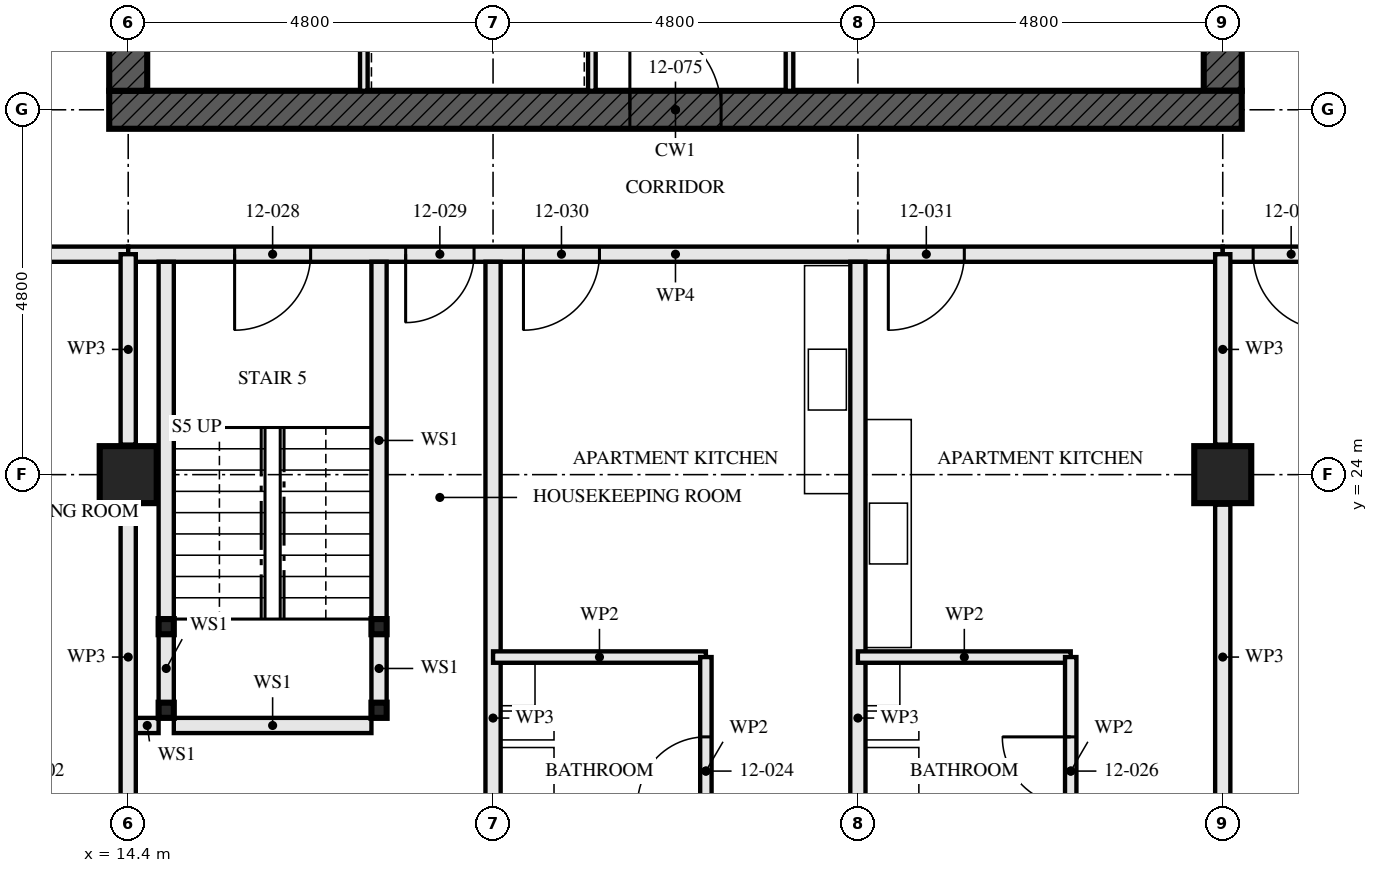
"""IFC4 building model, lengths in metres.
Left out: names, types, materials, properties, quantities, classifications, styles, units other than length and angle.
Written with IfcOpenShell. Run it as: python <this file> out.ifc"""

import sys

from ifc_helpers import new_model, si_unit, direction, frame, frame_2d, origin, origin_2d, place, context, subcontext, project, spatial, rectangle, hollow_rectangle, extrude, element, fill, save


model = new_model("IFC4")
c1 = context("Model", 3, precision=1e-05, world=origin(), true_north=direction((0.0, 1.0)))
c2 = subcontext(c1, "Body", "Model", "MODEL_VIEW")
j1 = project(units=[si_unit("LENGTHUNIT", "METRE"), si_unit("PLANEANGLEUNIT", "RADIAN")], contexts=[c1])
p1 = place(None, origin())
s1 = spatial("IfcSite", under=j1, at=p1, CompositionType="ELEMENT")
p2 = place(p1, origin())
s2 = spatial("IfcBuilding", under=s1, at=p2, CompositionType="ELEMENT")
p3 = place(p2, frame((0.0, 0.0, 48.0)))
s3 = spatial("IfcBuildingStorey", under=s2, at=p3, CompositionType="ELEMENT", Elevation=48.0)
for number, where, z_axis, x_axis in (
    (1, (14.4, 24.0, 0.0), (0.0, 0.0, 1.0), (1.0, 0.0, 0.0)),
    (2, (28.8, 24.0, 0.0), (0.0, 0.0, 1.0), (1.0, 0.0, 0.0)),
):
    element("IfcColumn", number, at=place(p3, frame(where, z_axis=z_axis, x_axis=x_axis)), inside=s3, PredefinedType="COLUMN", context=c2, shape_type="SweptSolid", body=[
        extrude(hollow_rectangle(XDim=0.75, YDim=0.75, WallThickness=0.08, at=origin_2d()), origin(), (0.0, 0.0, 1.0), 3.5),
    ])
p4 = place(p3, frame((14.15, 28.8, -0.17), z_axis=(0.0, 0.0, 1.0), x_axis=(1.0, 0.0, 0.0)))
e3 = element("IfcWall", 3, at=p4, inside=s3, PredefinedType="SHEAR", context=c2, shape_type="SweptSolid", body=[
    extrude(rectangle(XDim=14.9, YDim=0.5, at=frame_2d((7.45, 0.0))), origin(), (0.0, 0.0, 1.0), 3.5),
])
p5 = place(p4, frame((6.85, 0.0, 0.17)))
e4 = element("IfcOpeningElement", 4, at=p5, cuts=e3, PredefinedType="OPENING", context=c2, shape_type="SweptSolid", body=[
    extrude(rectangle(XDim=1.2, YDim=2.1, at=frame_2d((0.6, 1.05))), frame((0.0, 0.26, 0.0), z_axis=(0.0, -1.0, 0.0), x_axis=(1.0, 0.0, 0.0)), (0.0, 0.0, 1.0), 0.521),
])
p6 = place(p3, frame((14.4, 42.95, -0.17), z_axis=(0.0, 0.0, 1.0), x_axis=(0.0, -1.0, 0.0)))
e5 = element("IfcWall", 5, at=p6, inside=s3, PredefinedType="SHEAR", context=c2, shape_type="SweptSolid", body=[
    extrude(rectangle(XDim=13.9, YDim=0.5, at=frame_2d((6.95, 0.0))), origin(), (0.0, 0.0, 1.0), 3.5),
])
p7 = place(p6, frame((6.35, 0.0, 0.17)))
e6 = element("IfcOpeningElement", 6, at=p7, cuts=e5, PredefinedType="OPENING", context=c2, shape_type="SweptSolid", body=[
    extrude(rectangle(XDim=1.2, YDim=2.1, at=frame_2d((0.6, 1.05))), frame((0.0, 0.26, 0.0), z_axis=(0.0, -1.0, 0.0), x_axis=(1.0, 0.0, 0.0)), (0.0, 0.0, 1.0), 0.521),
])
p8 = place(p3, frame((28.8, 29.05, -0.17), z_axis=(0.0, 0.0, 1.0), x_axis=(0.0, 1.0, 0.0)))
e7 = element("IfcWall", 7, at=p8, inside=s3, PredefinedType="SHEAR", context=c2, shape_type="SweptSolid", body=[
    extrude(rectangle(XDim=13.9, YDim=0.5, at=frame_2d((6.95, 0.0))), origin(), (0.0, 0.0, 1.0), 3.5),
])
p9 = place(p8, frame((6.35, 0.0, 0.17)))
e8 = element("IfcOpeningElement", 8, at=p9, cuts=e7, PredefinedType="OPENING", context=c2, shape_type="SweptSolid", body=[
    extrude(rectangle(XDim=1.2, YDim=2.1, at=frame_2d((0.6, 1.05))), frame((0.0, 0.26, 0.0), z_axis=(0.0, -1.0, 0.0), x_axis=(1.0, 0.0, 0.0)), (0.0, 0.0, 1.0), 0.521),
])
for number, where, z_axis, x_axis in (
    (9, (14.9, 20.9, 0.0), (0.0, 0.0, 1.0), (1.0, 0.0, 0.0)),
    (10, (17.7, 20.9, 0.0), (0.0, 0.0, 1.0), (1.0, 0.0, 0.0)),
    (11, (14.9, 22.0, 0.0), (0.0, 0.0, 1.0), (1.0, 0.0, 0.0)),
    (12, (17.7, 22.0, 0.0), (0.0, 0.0, 1.0), (1.0, 0.0, 0.0)),
):
    element("IfcColumn", number, at=place(p3, frame(where, z_axis=z_axis, x_axis=x_axis)), inside=s3, PredefinedType="COLUMN", context=c2, shape_type="SweptSolid", body=[
        extrude(hollow_rectangle(XDim=0.2, YDim=0.2, WallThickness=0.008, at=origin_2d()), origin(), (0.0, 0.0, 1.0), 3.33),
    ])
p10 = place(p3, frame((4.8, 26.9, 0.0), z_axis=(0.0, 0.0, 1.0), x_axis=(1.0, 0.0, 0.0)))
e13 = element("IfcWall", 13, at=p10, inside=s3, PredefinedType="PARTITIONING", context=c2, shape_type="SweptSolid", body=[
    extrude(rectangle(XDim=9.6, YDim=0.2, at=frame_2d((4.8, 0.0))), origin(), (0.0, 0.0, 1.0), 3.33),
])
p11 = place(p10, frame((0.4, 0.0, 0.0)))
e14 = element("IfcOpeningElement", 14, at=p11, cuts=e13, PredefinedType="OPENING", context=c2, shape_type="SweptSolid", body=[
    extrude(rectangle(XDim=1.0, YDim=2.1, at=frame_2d((0.5, 1.05))), frame((0.0, 0.111, 0.0), z_axis=(0.0, -1.0, 0.0), x_axis=(1.0, 0.0, 0.0)), (0.0, 0.0, 1.0), 0.221),
])
p12 = place(p3, frame((14.9, 21.0, 0.0), z_axis=(0.0, 0.0, 1.0), x_axis=(0.0, 1.0, 0.0)))
e15 = element("IfcWall", 15, at=p12, inside=s3, PredefinedType="SOLIDWALL", context=c2, shape_type="SweptSolid", body=[
    extrude(rectangle(XDim=0.9, YDim=0.2, at=frame_2d((0.45, 0.0))), origin(), (0.0, 0.0, 1.0), 2.99),
])
p13 = place(p3, frame((14.9, 22.1, 0.0), z_axis=(0.0, 0.0, 1.0), x_axis=(0.0, 1.0, 0.0)))
e16 = element("IfcWall", 16, at=p13, inside=s3, PredefinedType="SOLIDWALL", context=c2, shape_type="SweptSolid", body=[
    extrude(rectangle(XDim=4.7, YDim=0.2, at=frame_2d((2.35, 0.0))), origin(), (0.0, 0.0, 1.0), 2.99),
])
p14 = place(p3, frame((17.7, 21.0, 0.0), z_axis=(0.0, 0.0, 1.0), x_axis=(0.0, 1.0, 0.0)))
e17 = element("IfcWall", 17, at=p14, inside=s3, PredefinedType="SOLIDWALL", context=c2, shape_type="SweptSolid", body=[
    extrude(rectangle(XDim=0.9, YDim=0.2, at=frame_2d((0.45, 0.0))), origin(), (0.0, 0.0, 1.0), 2.99),
])
p15 = place(p3, frame((17.7, 22.1, 0.0), z_axis=(0.0, 0.0, 1.0), x_axis=(0.0, 1.0, 0.0)))
e18 = element("IfcWall", 18, at=p15, inside=s3, PredefinedType="SOLIDWALL", context=c2, shape_type="SweptSolid", body=[
    extrude(rectangle(XDim=4.7, YDim=0.2, at=frame_2d((2.35, 0.0))), origin(), (0.0, 0.0, 1.0), 2.99),
])
p16 = place(p3, frame((14.5, 20.7, 0.0), z_axis=(0.0, 0.0, 1.0), x_axis=(1.0, 0.0, 0.0)))
e19 = element("IfcWall", 19, at=p16, inside=s3, PredefinedType="SOLIDWALL", context=c2, shape_type="SweptSolid", body=[
    extrude(rectangle(XDim=0.3, YDim=0.2, at=frame_2d((0.15, 0.0))), origin(), (0.0, 0.0, 1.0), 3.33),
])
p17 = place(p3, frame((15.0, 20.7, 0.0), z_axis=(0.0, 0.0, 1.0), x_axis=(1.0, 0.0, 0.0)))
e20 = element("IfcWall", 20, at=p17, inside=s3, PredefinedType="SOLIDWALL", context=c2, shape_type="SweptSolid", body=[
    extrude(rectangle(XDim=2.6, YDim=0.2, at=frame_2d((1.3, 0.0))), origin(), (0.0, 0.0, 1.0), 3.33),
])
p18 = place(p3, frame((19.2, 14.795, 0.0), z_axis=(0.0, 0.0, 1.0), x_axis=(0.0, 1.0, 0.0)))
e21 = element("IfcWall", 21, at=p18, inside=s3, PredefinedType="PARTITIONING", context=c2, shape_type="SweptSolid", body=[
    extrude(rectangle(XDim=12.005, YDim=0.2, at=frame_2d((6.002, 0.0))), origin(), (0.0, 0.0, 1.0), 2.55),
])
p19 = place(p3, frame((22.0, 18.6, 0.0), z_axis=(0.0, 0.0, 1.0), x_axis=(0.0, 1.0, 0.0)))
e22 = element("IfcWall", 22, at=p19, inside=s3, PredefinedType="PARTITIONING", context=c2, shape_type="SweptSolid", body=[
    extrude(rectangle(XDim=3.0, YDim=0.15, at=frame_2d((1.5, 0.0))), origin(), (0.0, 0.0, 1.0), 2.55),
])
p20 = place(p19, frame((1.05, 0.0, 0.0)))
e23 = element("IfcOpeningElement", 23, at=p20, cuts=e22, PredefinedType="OPENING", context=c2, shape_type="SweptSolid", body=[
    extrude(rectangle(XDim=0.9, YDim=2.1, at=frame_2d((0.45, 1.05))), frame((0.0, 0.085, 0.0), z_axis=(0.0, -1.0, 0.0), x_axis=(1.0, 0.0, 0.0)), (0.0, 0.0, 1.0), 0.171),
])
p21 = place(p3, frame((19.2, 21.6, 0.0), z_axis=(0.0, 0.0, 1.0), x_axis=(1.0, 0.0, 0.0)))
e24 = element("IfcWall", 24, at=p21, inside=s3, PredefinedType="PARTITIONING", context=c2, shape_type="SweptSolid", body=[
    extrude(rectangle(XDim=2.8, YDim=0.15, at=frame_2d((1.4, 0.0))), origin(), (0.0, 0.0, 1.0), 3.33),
])
p22 = place(p3, frame((24.0, 14.795, 0.0), z_axis=(0.0, 0.0, 1.0), x_axis=(0.0, 1.0, 0.0)))
e25 = element("IfcWall", 25, at=p22, inside=s3, PredefinedType="PARTITIONING", context=c2, shape_type="SweptSolid", body=[
    extrude(rectangle(XDim=12.005, YDim=0.2, at=frame_2d((6.002, 0.0))), origin(), (0.0, 0.0, 1.0), 2.55),
])
p23 = place(p3, frame((26.8, 18.6, 0.0), z_axis=(0.0, 0.0, 1.0), x_axis=(0.0, 1.0, 0.0)))
e26 = element("IfcWall", 26, at=p23, inside=s3, PredefinedType="PARTITIONING", context=c2, shape_type="SweptSolid", body=[
    extrude(rectangle(XDim=3.0, YDim=0.15, at=frame_2d((1.5, 0.0))), origin(), (0.0, 0.0, 1.0), 2.55),
])
p24 = place(p23, frame((1.05, 0.0, 0.0)))
e27 = element("IfcOpeningElement", 27, at=p24, cuts=e26, PredefinedType="OPENING", context=c2, shape_type="SweptSolid", body=[
    extrude(rectangle(XDim=0.9, YDim=2.1, at=frame_2d((0.45, 1.05))), frame((0.0, 0.085, 0.0), z_axis=(0.0, -1.0, 0.0), x_axis=(1.0, 0.0, 0.0)), (0.0, 0.0, 1.0), 0.171),
])
p25 = place(p3, frame((24.0, 21.6, 0.0), z_axis=(0.0, 0.0, 1.0), x_axis=(1.0, 0.0, 0.0)))
e28 = element("IfcWall", 28, at=p25, inside=s3, PredefinedType="PARTITIONING", context=c2, shape_type="SweptSolid", body=[
    extrude(rectangle(XDim=2.8, YDim=0.15, at=frame_2d((1.4, 0.0))), origin(), (0.0, 0.0, 1.0), 3.33),
])
p26 = place(p3, frame((14.4, 26.9, 0.0), z_axis=(0.0, 0.0, 1.0), x_axis=(1.0, 0.0, 0.0)))
e29 = element("IfcWall", 29, at=p26, inside=s3, PredefinedType="PARTITIONING", context=c2, shape_type="SweptSolid", body=[
    extrude(rectangle(XDim=14.4, YDim=0.2, at=frame_2d((7.2, 0.0))), origin(), (0.0, 0.0, 1.0), 2.55),
])
p27 = place(p26, frame((1.4, 0.0, 0.0)))
e30 = element("IfcOpeningElement", 30, at=p27, cuts=e29, PredefinedType="OPENING", context=c2, shape_type="SweptSolid", body=[
    extrude(rectangle(XDim=1.0, YDim=2.1, at=frame_2d((0.5, 1.05))), frame((0.0, 0.111, 0.0), z_axis=(0.0, -1.0, 0.0), x_axis=(1.0, 0.0, 0.0)), (0.0, 0.0, 1.0), 0.221),
])
p28 = place(p26, frame((3.65, 0.0, 0.0)))
e31 = element("IfcOpeningElement", 31, at=p28, cuts=e29, PredefinedType="OPENING", context=c2, shape_type="SweptSolid", body=[
    extrude(rectangle(XDim=0.9, YDim=2.1, at=frame_2d((0.45, 1.05))), frame((0.0, 0.111, 0.0), z_axis=(0.0, -1.0, 0.0), x_axis=(1.0, 0.0, 0.0)), (0.0, 0.0, 1.0), 0.221),
])
p29 = place(p26, frame((5.2, 0.0, 0.0)))
e32 = element("IfcOpeningElement", 32, at=p29, cuts=e29, PredefinedType="OPENING", context=c2, shape_type="SweptSolid", body=[
    extrude(rectangle(XDim=1.0, YDim=2.1, at=frame_2d((0.5, 1.05))), frame((0.0, 0.111, 0.0), z_axis=(0.0, -1.0, 0.0), x_axis=(1.0, 0.0, 0.0)), (0.0, 0.0, 1.0), 0.221),
])
p30 = place(p26, frame((10.0, 0.0, 0.0)))
e33 = element("IfcOpeningElement", 33, at=p30, cuts=e29, PredefinedType="OPENING", context=c2, shape_type="SweptSolid", body=[
    extrude(rectangle(XDim=1.0, YDim=2.1, at=frame_2d((0.5, 1.05))), frame((0.0, 0.111, 0.0), z_axis=(0.0, -1.0, 0.0), x_axis=(1.0, 0.0, 0.0)), (0.0, 0.0, 1.0), 0.221),
])
p31 = place(p3, frame((28.8, 26.9, 0.0), z_axis=(0.0, 0.0, 1.0), x_axis=(1.0, 0.0, 0.0)))
e34 = element("IfcWall", 34, at=p31, inside=s3, PredefinedType="PARTITIONING", context=c2, shape_type="SweptSolid", body=[
    extrude(rectangle(XDim=9.6, YDim=0.2, at=frame_2d((4.8, 0.0))), origin(), (0.0, 0.0, 1.0), 3.33),
])
p32 = place(p31, frame((0.4, 0.0, 0.0)))
e35 = element("IfcOpeningElement", 35, at=p32, cuts=e34, PredefinedType="OPENING", context=c2, shape_type="SweptSolid", body=[
    extrude(rectangle(XDim=1.0, YDim=2.1, at=frame_2d((0.5, 1.05))), frame((0.0, 0.111, 0.0), z_axis=(0.0, -1.0, 0.0), x_axis=(1.0, 0.0, 0.0)), (0.0, 0.0, 1.0), 0.221),
])
p33 = place(p3, frame((20.5, 29.05, 0.0), z_axis=(0.0, 0.0, 1.0), x_axis=(0.0, 1.0, 0.0)))
e36 = element("IfcWall", 36, at=p33, inside=s3, PredefinedType="SOLIDWALL", context=c2, shape_type="SweptSolid", body=[
    extrude(rectangle(XDim=5.8, YDim=0.1, at=frame_2d((2.9, 0.0))), origin(), (0.0, 0.0, 1.0), 3.33),
])
p34 = place(p33, frame((0.8, 0.0, 0.0)))
e37 = element("IfcOpeningElement", 37, at=p34, cuts=e36, PredefinedType="OPENING", context=c2, shape_type="SweptSolid", body=[
    extrude(rectangle(XDim=1.1, YDim=2.3, at=frame_2d((0.55, 1.15))), frame((0.0, 0.061, 0.0), z_axis=(0.0, -1.0, 0.0), x_axis=(1.0, 0.0, 0.0)), (0.0, 0.0, 1.0), 0.121),
])
p35 = place(p33, frame((3.775, 0.0, 0.0)))
e38 = element("IfcOpeningElement", 38, at=p35, cuts=e36, PredefinedType="OPENING", context=c2, shape_type="SweptSolid", body=[
    extrude(rectangle(XDim=1.1, YDim=2.3, at=frame_2d((0.55, 1.15))), frame((0.0, 0.061, 0.0), z_axis=(0.0, -1.0, 0.0), x_axis=(1.0, 0.0, 0.0)), (0.0, 0.0, 1.0), 0.121),
])
p36 = place(p3, frame((23.1, 29.05, 0.0), z_axis=(0.0, 0.0, 1.0), x_axis=(0.0, 1.0, 0.0)))
e39 = element("IfcWall", 39, at=p36, inside=s3, PredefinedType="SOLIDWALL", context=c2, shape_type="SweptSolid", body=[
    extrude(rectangle(XDim=5.8, YDim=0.1, at=frame_2d((2.9, 0.0))), origin(), (0.0, 0.0, 1.0), 3.33),
])
p37 = place(p36, frame((1.0, 0.0, 0.0)))
e40 = element("IfcOpeningElement", 40, at=p37, cuts=e39, PredefinedType="OPENING", context=c2, shape_type="SweptSolid", body=[
    extrude(rectangle(XDim=0.7, YDim=2.1, at=frame_2d((0.35, 1.05))), frame((0.0, 0.061, 0.0), z_axis=(0.0, -1.0, 0.0), x_axis=(1.0, 0.0, 0.0)), (0.0, 0.0, 1.0), 0.121),
])
p38 = place(p3, frame((17.5, 29.05, 0.0), z_axis=(0.0, 0.0, 1.0), x_axis=(0.0, 1.0, 0.0)))
e41 = element("IfcWall", 41, at=p38, inside=s3, PredefinedType="SOLIDWALL", context=c2, shape_type="SweptSolid", body=[
    extrude(rectangle(XDim=5.8, YDim=0.1, at=frame_2d((2.9, 0.0))), origin(), (0.0, 0.0, 1.0), 3.33),
])
p39 = place(p3, frame((14.4, 19.595, 0.0), z_axis=(0.0, 0.0, 1.0), x_axis=(0.0, 1.0, 0.0)))
e42 = element("IfcWall", 42, at=p39, inside=s3, PredefinedType="PARTITIONING", context=c2, shape_type="SweptSolid", body=[
    extrude(rectangle(XDim=4.01, YDim=0.2, at=frame_2d((2.005, 0.0))), origin(), (0.0, 0.0, 1.0), 2.32),
])
p40 = place(p3, frame((14.4, 24.395, 0.0), z_axis=(0.0, 0.0, 1.0), x_axis=(0.0, 1.0, 0.0)))
e43 = element("IfcWall", 43, at=p40, inside=s3, PredefinedType="PARTITIONING", context=c2, shape_type="SweptSolid", body=[
    extrude(rectangle(XDim=2.505, YDim=0.2, at=frame_2d((1.252, 0.0))), origin(), (0.0, 0.0, 1.0), 2.32),
])
p41 = place(p3, frame((28.8, 19.595, 0.0), z_axis=(0.0, 0.0, 1.0), x_axis=(0.0, 1.0, 0.0)))
e44 = element("IfcWall", 44, at=p41, inside=s3, PredefinedType="PARTITIONING", context=c2, shape_type="SweptSolid", body=[
    extrude(rectangle(XDim=4.01, YDim=0.2, at=frame_2d((2.005, 0.0))), origin(), (0.0, 0.0, 1.0), 2.32),
])
p42 = place(p3, frame((28.8, 24.395, 0.0), z_axis=(0.0, 0.0, 1.0), x_axis=(0.0, 1.0, 0.0)))
e45 = element("IfcWall", 45, at=p42, inside=s3, PredefinedType="PARTITIONING", context=c2, shape_type="SweptSolid", body=[
    extrude(rectangle(XDim=2.505, YDim=0.2, at=frame_2d((1.252, 0.0))), origin(), (0.0, 0.0, 1.0), 2.32),
])
p43 = place(p20, origin())
e46 = element("IfcDoor", 46, at=p43, inside=s3, OperationType="SINGLE_SWING_RIGHT", PredefinedType="DOOR", context=c2, shape_type="SweptSolid", body=[
    extrude(rectangle(XDim=0.9, YDim=2.1, at=frame_2d((0.45, 1.05))), frame((0.0, 0.022, 0.0), z_axis=(0.0, -1.0, 0.0), x_axis=(1.0, 0.0, 0.0)), (0.0, 0.0, 1.0), 0.044),
])
fill(e23, e46)
p44 = place(p24, origin())
e47 = element("IfcDoor", 47, at=p44, inside=s3, OperationType="SINGLE_SWING_LEFT", PredefinedType="DOOR", context=c2, shape_type="SweptSolid", body=[
    extrude(rectangle(XDim=0.9, YDim=2.1, at=frame_2d((0.45, 1.05))), frame((0.0, 0.022, 0.0), z_axis=(0.0, -1.0, 0.0), x_axis=(1.0, 0.0, 0.0)), (0.0, 0.0, 1.0), 0.044),
])
fill(e27, e47)
p45 = place(p27, frame((1.0, 0.0, 0.0), z_axis=(0.0, 0.0, 1.0), x_axis=(-1.0, 0.0, 0.0)))
e48 = element("IfcDoor", 48, at=p45, inside=s3, OperationType="SINGLE_SWING_LEFT", PredefinedType="DOOR", context=c2, shape_type="SweptSolid", body=[
    extrude(rectangle(XDim=1.0, YDim=2.1, at=frame_2d((0.5, 1.05))), frame((0.0, 0.032, 0.0), z_axis=(0.0, -1.0, 0.0), x_axis=(1.0, 0.0, 0.0)), (0.0, 0.0, 1.0), 0.064),
])
fill(e30, e48)
p46 = place(p28, frame((0.9, 0.0, 0.0), z_axis=(0.0, 0.0, 1.0), x_axis=(-1.0, 0.0, 0.0)))
e49 = element("IfcDoor", 49, at=p46, inside=s3, OperationType="SINGLE_SWING_LEFT", PredefinedType="DOOR", context=c2, shape_type="SweptSolid", body=[
    extrude(rectangle(XDim=0.9, YDim=2.1, at=frame_2d((0.45, 1.05))), frame((0.0, 0.027, 0.0), z_axis=(0.0, -1.0, 0.0), x_axis=(1.0, 0.0, 0.0)), (0.0, 0.0, 1.0), 0.054),
])
fill(e31, e49)
p47 = place(p29, frame((1.0, 0.0, 0.0), z_axis=(0.0, 0.0, 1.0), x_axis=(-1.0, 0.0, 0.0)))
e50 = element("IfcDoor", 50, at=p47, inside=s3, OperationType="SINGLE_SWING_LEFT", PredefinedType="DOOR", context=c2, shape_type="SweptSolid", body=[
    extrude(rectangle(XDim=1.0, YDim=2.1, at=frame_2d((0.5, 1.05))), frame((0.0, 0.027, 0.0), z_axis=(0.0, -1.0, 0.0), x_axis=(1.0, 0.0, 0.0)), (0.0, 0.0, 1.0), 0.054),
])
fill(e32, e50)
p48 = place(p30, frame((1.0, 0.0, 0.0), z_axis=(0.0, 0.0, 1.0), x_axis=(-1.0, 0.0, 0.0)))
e51 = element("IfcDoor", 51, at=p48, inside=s3, OperationType="SINGLE_SWING_LEFT", PredefinedType="DOOR", context=c2, shape_type="SweptSolid", body=[
    extrude(rectangle(XDim=1.0, YDim=2.1, at=frame_2d((0.5, 1.05))), frame((0.0, 0.027, 0.0), z_axis=(0.0, -1.0, 0.0), x_axis=(1.0, 0.0, 0.0)), (0.0, 0.0, 1.0), 0.054),
])
fill(e33, e51)
p49 = place(p32, frame((1.0, 0.0, 0.0), z_axis=(0.0, 0.0, 1.0), x_axis=(-1.0, 0.0, 0.0)))
e52 = element("IfcDoor", 52, at=p49, inside=s3, OperationType="SINGLE_SWING_RIGHT", PredefinedType="DOOR", context=c2, shape_type="SweptSolid", body=[
    extrude(rectangle(XDim=1.0, YDim=2.1, at=frame_2d((0.5, 1.05))), frame((0.0, 0.027, 0.0), z_axis=(0.0, -1.0, 0.0), x_axis=(1.0, 0.0, 0.0)), (0.0, 0.0, 1.0), 0.054),
])
fill(e35, e52)
p50 = place(p5, origin())
e53 = element("IfcDoor", 53, at=p50, inside=s3, OperationType="SINGLE_SWING_LEFT", PredefinedType="DOOR", context=c2, shape_type="SweptSolid", body=[
    extrude(rectangle(XDim=1.2, YDim=2.1, at=frame_2d((0.6, 1.05))), frame((0.0, 0.027, 0.0), z_axis=(0.0, -1.0, 0.0), x_axis=(1.0, 0.0, 0.0)), (0.0, 0.0, 1.0), 0.054),
])
fill(e4, e53)
save(model, sys.argv[1])
